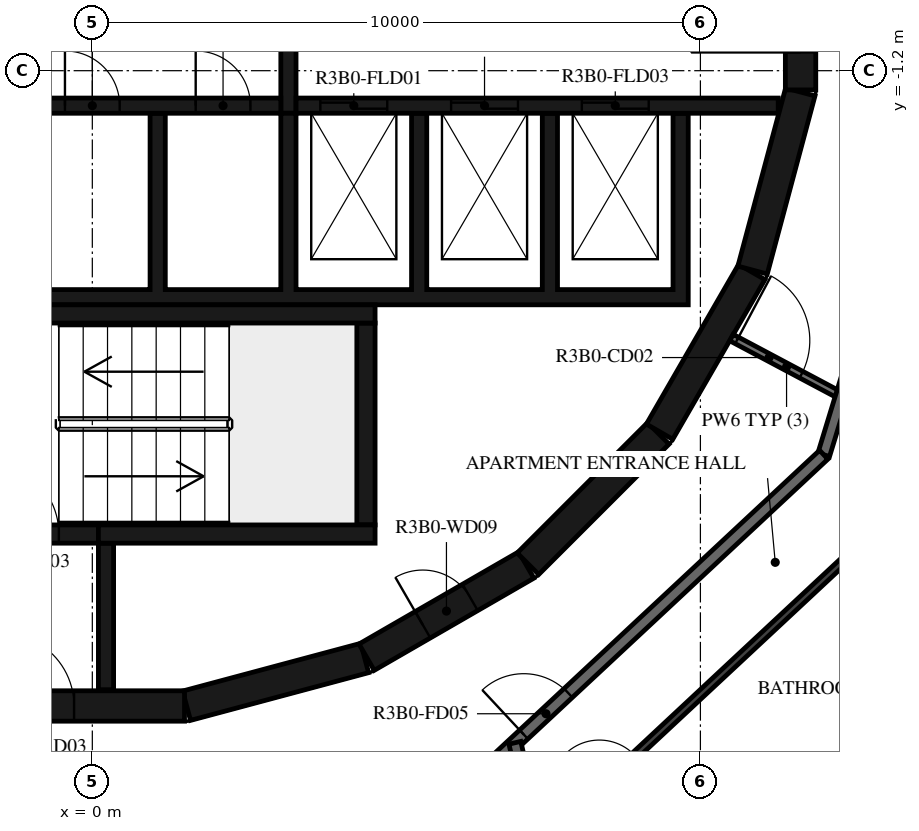
"""IFC4 building model, lengths in metres.
Left out: names, types, materials, properties, quantities, classifications, styles, units other than length and angle.
Written with IfcOpenShell. Run it as: python <this file> out.ifc"""

import sys

from ifc_helpers import new_model, si_unit, direction, frame, frame_2d, origin, place, context, subcontext, project, spatial, polyline, rectangle, outline, extrude, element, fill, save


model = new_model("IFC4")
c1 = context("Model", 3, precision=1e-05, world=origin(), true_north=direction((0.0, 1.0)))
c2 = subcontext(c1, "Body", "Model", "MODEL_VIEW")
j1 = project(units=[si_unit("LENGTHUNIT", "METRE"), si_unit("PLANEANGLEUNIT", "RADIAN")], contexts=[c1])
p1 = place(None, origin())
s1 = spatial("IfcSite", under=j1, at=p1, CompositionType="ELEMENT")
p2 = place(p1, origin())
s2 = spatial("IfcBuilding", under=s1, at=p2, CompositionType="ELEMENT")
p3 = place(p2, frame((0.0, 0.0, 127.4)))
s3 = spatial("IfcBuildingStorey", under=s2, at=p3, CompositionType="ELEMENT", Elevation=127.4)
p4 = place(p3, frame((1.55, -11.643, 0.0), z_axis=(0.0, 0.0, 1.0), x_axis=(0.965948410781, 0.258734743916, 0.0)))
e1 = element("IfcWall", 1, at=p4, inside=s3, PredefinedType="SHEAR", context=c2, shape_type="SweptSolid", body=[
    extrude(rectangle(XDim=3.033, YDim=0.5, at=frame_2d((1.516, 0.0))), origin(), (0.0, 0.0, 1.0), 3.12),
])
p5 = place(p3, frame((4.51, -10.845, 0.0), z_axis=(0.0, 0.0, 1.0), x_axis=(0.865975092491, 0.500087131594, 0.0)))
e2 = element("IfcWall", 2, at=p5, inside=s3, PredefinedType="SHEAR", context=c2, shape_type="SweptSolid", body=[
    extrude(rectangle(XDim=3.033, YDim=0.5, at=frame_2d((1.516, 0.0))), origin(), (0.0, 0.0, 1.0), 3.12),
])
p6 = place(p5, frame((1.066, 0.0, 0.0)))
e3 = element("IfcOpeningElement", 3, at=p6, cuts=e2, PredefinedType="OPENING", context=c2, shape_type="SweptSolid", body=[
    extrude(rectangle(XDim=0.9, YDim=2.1, at=frame_2d((0.45, 1.05))), frame((0.0, 0.26, 0.0), z_axis=(0.0, -1.0, 0.0), x_axis=(1.0, 0.0, 0.0)), (0.0, 0.0, 1.0), 0.52),
])
p7 = place(p3, frame((7.164, -9.308, 0.0), z_axis=(0.0, 0.0, 1.0), x_axis=(0.707106781187, 0.707106781187, 0.0)))
e4 = element("IfcWall", 4, at=p7, inside=s3, PredefinedType="SHEAR", context=c2, shape_type="SweptSolid", body=[
    extrude(rectangle(XDim=3.032, YDim=0.5, at=frame_2d((1.516, 0.0))), origin(), (0.0, 0.0, 1.0), 3.12),
])
for number, where, z_axis, x_axis in (
    (5, (9.329, -7.137, 0.0), (0.0, 0.0, 1.0), (0.5, 0.866, 0.0)),
    (6, (10.858, -4.479, 0.0), (0.0, 0.0, 1.0), (0.259, 0.966, 0.0)),
):
    element("IfcWall", number, at=place(p3, frame(where, z_axis=z_axis, x_axis=x_axis)), inside=s3, PredefinedType="SHEAR", context=c2, shape_type="SweptSolid", body=[
        extrude(rectangle(XDim=3.033, YDim=0.5, at=frame_2d((1.516, 0.0))), origin(), (0.0, 0.0, 1.0), 3.12),
    ])
p8 = place(p3, frame((11.647, -1.516, 0.0), z_axis=(0.0, 0.0, 1.0), x_axis=(0.0, 1.0, 0.0)))
e7 = element("IfcWall", 7, at=p8, inside=s3, PredefinedType="SHEAR", context=c2, shape_type="SweptSolid", body=[
    extrude(rectangle(XDim=3.033, YDim=0.5, at=frame_2d((1.516, 0.0))), origin(), (0.0, 0.0, 1.0), 3.12),
])
p9 = place(p8, frame((0.616, 0.0, 0.0)))
e8 = element("IfcOpeningElement", 8, at=p9, cuts=e7, PredefinedType="OPENING", context=c2, shape_type="SweptSolid", body=[
    extrude(rectangle(XDim=1.8, YDim=2.1, at=frame_2d((0.9, 1.05))), frame((0.0, 0.26, 0.0), z_axis=(0.0, -1.0, 0.0), x_axis=(1.0, 0.0, 0.0)), (0.0, 0.0, 1.0), 0.52),
])
p10 = place(p3, frame((-1.516, -11.647, 0.0), z_axis=(0.0, 0.0, 1.0), x_axis=(1.0, 0.0, 0.0)))
e9 = element("IfcWall", 9, at=p10, inside=s3, PredefinedType="SHEAR", context=c2, shape_type="SweptSolid", body=[
    extrude(rectangle(XDim=3.033, YDim=0.5, at=frame_2d((1.516, 0.0))), origin(), (0.0, 0.0, 1.0), 3.12),
])
p11 = place(p10, frame((0.016, 0.0, 0.0)))
e10 = element("IfcOpeningElement", 10, at=p11, cuts=e9, PredefinedType="OPENING", context=c2, shape_type="SweptSolid", body=[
    extrude(rectangle(XDim=1.2, YDim=2.1, at=frame_2d((0.6, 1.05))), frame((0.0, 0.26, 0.0), z_axis=(0.0, -1.0, 0.0), x_axis=(1.0, 0.0, 0.0)), (0.0, 0.0, 1.0), 0.52),
])
p12 = place(p3, frame((-2.4, -5.2, 0.0), z_axis=(0.0, 0.0, 1.0), x_axis=(1.0, 0.0, 0.0)))
e11 = element("IfcWall", 11, at=p12, inside=s3, PredefinedType="SHEAR", context=c2, shape_type="SweptSolid", body=[
    extrude(rectangle(XDim=7.05, YDim=0.3, at=frame_2d((3.525, 0.0))), origin(), (0.0, 0.0, 1.0), 3.12),
])
p13 = place(p3, frame((4.5, -8.67, 0.0), z_axis=(0.0, 0.0, 1.0), x_axis=(0.0, 1.0, 0.0)))
e12 = element("IfcWall", 12, at=p13, inside=s3, PredefinedType="SHEAR", context=c2, shape_type="SweptSolid", body=[
    extrude(rectangle(XDim=3.32, YDim=0.3, at=frame_2d((1.66, 0.0))), origin(), (0.0, 0.0, 1.0), 3.12),
])
p14 = place(p3, frame((0.1, -8.82, 0.0), z_axis=(0.0, 0.0, 1.0), x_axis=(1.0, 0.0, 0.0)))
e13 = element("IfcWall", 13, at=p14, inside=s3, PredefinedType="SHEAR", context=c2, shape_type="SweptSolid", body=[
    extrude(rectangle(XDim=4.55, YDim=0.3, at=frame_2d((2.275, 0.0))), origin(), (0.0, 0.0, 1.0), 3.12),
])
p15 = place(p3, frame((-2.4, -8.82, 0.0), z_axis=(0.0, 0.0, 1.0), x_axis=(1.0, 0.0, 0.0)))
e14 = element("IfcWall", 14, at=p15, inside=s3, PredefinedType="SHEAR", context=c2, shape_type="SweptSolid", body=[
    extrude(rectangle(XDim=2.5, YDim=0.3, at=frame_2d((1.25, 0.0))), origin(), (0.0, 0.0, 1.0), 3.12),
])
p16 = place(p15, frame((0.65, 0.0, 0.0)))
e15 = element("IfcOpeningElement", 15, at=p16, cuts=e14, PredefinedType="OPENING", context=c2, shape_type="SweptSolid", body=[
    extrude(rectangle(XDim=1.2, YDim=2.1, at=frame_2d((0.6, 1.05))), frame((0.0, 0.16, 0.0), z_axis=(0.0, -1.0, 0.0), x_axis=(1.0, 0.0, 0.0)), (0.0, 0.0, 1.0), 0.32),
])
p17 = place(p3, frame((0.225, -8.97, 0.0), z_axis=(0.0, 0.0, 1.0), x_axis=(0.0, -1.0, 0.0)))
e16 = element("IfcWall", 16, at=p17, inside=s3, PredefinedType="SHEAR", context=c2, shape_type="SweptSolid", body=[
    extrude(rectangle(XDim=2.41, YDim=0.25, at=frame_2d((1.205, 0.0))), origin(), (0.0, 0.0, 1.0), 3.12),
])
p18 = place(p3, origin())
e17 = element("IfcWall", 17, at=p18, inside=s3, PredefinedType="SHEAR", context=c2, shape_type="SweptSolid", body=[
    extrude(outline(polyline([(9.8, -5.05), (9.8, -4.8), (9.8, -1.9), (9.55, -1.9), (9.55, -4.8), (7.65, -4.8), (7.65, -1.9), (7.4, -1.9), (7.4, -4.8), (5.5, -4.8), (5.5, -1.9), (5.25, -1.9), (5.25, -4.8), (3.35, -4.8), (3.35, -1.9), (3.1, -1.9), (3.1, -4.8), (1.2, -4.8), (1.2, -1.9), (0.95, -1.9), (0.95, -4.8), (-0.95, -4.8), (-0.95, -1.9), (-1.2, -1.9), (-1.2, -4.8), (-5.25, -4.8), (-5.25, -1.9), (-5.5, -1.9), (-5.5, -4.8), (-7.4, -4.8), (-7.4, -1.9), (-7.65, -1.9), (-7.65, -4.8), (-9.55, -4.8), (-9.55, -1.9), (-9.8, -1.9), (-9.8, -4.8), (-9.8, -5.05), (9.8, -5.05)])), origin(), (0.0, 0.0, 1.0), 3.12),
])
p19 = place(p3, frame((-11.28, -1.775, 0.0), z_axis=(0.0, 0.0, 1.0), x_axis=(1.0, 0.0, 0.0)))
e18 = element("IfcWall", 18, at=p19, inside=s3, PredefinedType="SHEAR", context=c2, shape_type="SweptSolid", body=[
    extrude(rectangle(XDim=14.38, YDim=0.25, at=frame_2d((7.19, 0.0))), origin(), (0.0, 0.0, 1.0), 3.12),
])
p20 = place(p19, frame((7.605, 0.0, 0.0)))
e19 = element("IfcOpeningElement", 19, at=p20, cuts=e18, PredefinedType="OPENING", context=c2, shape_type="SweptSolid", body=[
    extrude(rectangle(XDim=0.9, YDim=2.1, at=frame_2d((0.45, 1.05))), frame((0.0, 0.135, 0.0), z_axis=(0.0, -1.0, 0.0), x_axis=(1.0, 0.0, 0.0)), (0.0, 0.0, 1.0), 0.27),
])
p21 = place(p19, frame((10.83, 0.0, 0.0)))
e20 = element("IfcOpeningElement", 20, at=p21, cuts=e18, PredefinedType="OPENING", context=c2, shape_type="SweptSolid", body=[
    extrude(rectangle(XDim=0.9, YDim=2.1, at=frame_2d((0.45, 1.05))), frame((0.0, 0.135, 0.0), z_axis=(0.0, -1.0, 0.0), x_axis=(1.0, 0.0, 0.0)), (0.0, 0.0, 1.0), 0.27),
])
p22 = place(p19, frame((12.98, 0.0, 0.0)))
e21 = element("IfcOpeningElement", 21, at=p22, cuts=e18, PredefinedType="OPENING", context=c2, shape_type="SweptSolid", body=[
    extrude(rectangle(XDim=0.9, YDim=2.1, at=frame_2d((0.45, 1.05))), frame((0.0, 0.135, 0.0), z_axis=(0.0, -1.0, 0.0), x_axis=(1.0, 0.0, 0.0)), (0.0, 0.0, 1.0), 0.27),
])
p23 = place(p3, frame((3.35, -1.775, 0.0), z_axis=(0.0, 0.0, 1.0), x_axis=(1.0, 0.0, 0.0)))
e22 = element("IfcWall", 22, at=p23, inside=s3, PredefinedType="SHEAR", context=c2, shape_type="SweptSolid", body=[
    extrude(rectangle(XDim=7.93, YDim=0.25, at=frame_2d((3.965, 0.0))), origin(), (0.0, 0.0, 1.0), 3.12),
])
p24 = place(p23, frame((0.4, 0.0, 0.0)))
e23 = element("IfcOpeningElement", 23, at=p24, cuts=e22, PredefinedType="OPENING", context=c2, shape_type="SweptSolid", body=[
    extrude(rectangle(XDim=1.1, YDim=2.4, at=frame_2d((0.55, 1.2))), frame((0.0, 0.135, 0.0), z_axis=(0.0, -1.0, 0.0), x_axis=(1.0, 0.0, 0.0)), (0.0, 0.0, 1.0), 0.27),
])
p25 = place(p23, frame((2.55, 0.0, 0.0)))
e24 = element("IfcOpeningElement", 24, at=p25, cuts=e22, PredefinedType="OPENING", context=c2, shape_type="SweptSolid", body=[
    extrude(rectangle(XDim=1.1, YDim=2.4, at=frame_2d((0.55, 1.2))), frame((0.0, 0.135, 0.0), z_axis=(0.0, -1.0, 0.0), x_axis=(1.0, 0.0, 0.0)), (0.0, 0.0, 1.0), 0.27),
])
p26 = place(p23, frame((4.7, 0.0, 0.0)))
e25 = element("IfcOpeningElement", 25, at=p26, cuts=e22, PredefinedType="OPENING", context=c2, shape_type="SweptSolid", body=[
    extrude(rectangle(XDim=1.1, YDim=2.4, at=frame_2d((0.55, 1.2))), frame((0.0, 0.135, 0.0), z_axis=(0.0, -1.0, 0.0), x_axis=(1.0, 0.0, 0.0)), (0.0, 0.0, 1.0), 0.27),
])
p27 = place(p3, frame((3.225, -1.9, 0.0), z_axis=(0.0, 0.0, 1.0), x_axis=(0.0, 1.0, 0.0)))
e26 = element("IfcWall", 26, at=p27, inside=s3, PredefinedType="SHEAR", context=c2, shape_type="SweptSolid", body=[
    extrude(rectangle(XDim=3.8, YDim=0.25, at=frame_2d((1.9, 0.0))), origin(), (0.0, 0.0, 1.0), 3.12),
])
p28 = place(p3, frame((10.511, -5.589, 0.0), z_axis=(0.0, 0.0, 1.0), x_axis=(0.882987820808, -0.469395897196, 0.0)))
e27 = element("IfcWall", 27, at=p28, inside=s3, PredefinedType="PARTITIONING", context=c2, shape_type="SweptSolid", body=[
    extrude(rectangle(XDim=2.052, YDim=0.12, at=frame_2d((1.026, 0.0))), origin(), (0.0, 0.0, 1.0), 3.12),
])
p29 = place(p28, frame((0.1, 0.0, 0.0)))
e28 = element("IfcOpeningElement", 28, at=p29, cuts=e27, PredefinedType="OPENING", context=c2, shape_type="SweptSolid", body=[
    extrude(rectangle(XDim=1.2, YDim=2.1, at=frame_2d((0.6, 1.05))), frame((0.0, 0.07, 0.0), z_axis=(0.0, -1.0, 0.0), x_axis=(1.0, 0.0, 0.0)), (0.0, 0.0, 1.0), 0.14),
])
p30 = place(p3, frame((12.028, -7.516, 0.0), z_axis=(0.0, 0.0, 1.0), x_axis=(0.292365533182, 0.956306642771, 0.0)))
e29 = element("IfcWall", 29, at=p30, inside=s3, PredefinedType="STANDARD", context=c2, shape_type="SweptSolid", body=[
    extrude(rectangle(XDim=7.342, YDim=0.2, at=frame_2d((3.671, 0.0))), origin(), (0.0, 0.0, 1.0), 3.12),
])
p31 = place(p3, frame((-7.516, -12.028, 0.0), z_axis=(0.0, 0.0, 1.0), x_axis=(0.956306642771, -0.292365533182, 0.0)))
e30 = element("IfcWall", 30, at=p31, inside=s3, PredefinedType="STANDARD", context=c2, shape_type="SweptSolid", body=[
    extrude(rectangle(XDim=7.342, YDim=0.2, at=frame_2d((3.671, 0.0))), origin(), (0.0, 0.0, 1.0), 3.12),
])
p32 = place(p31, frame((6.142, 0.0, 0.0)))
e31 = element("IfcOpeningElement", 31, at=p32, cuts=e30, PredefinedType="OPENING", context=c2, shape_type="SweptSolid", body=[
    extrude(rectangle(XDim=1.0, YDim=2.1, at=frame_2d((0.5, 1.05))), frame((0.0, 0.11, 0.0), z_axis=(0.0, -1.0, 0.0), x_axis=(1.0, 0.0, 0.0)), (0.0, 0.0, 1.0), 0.22),
])
p33 = place(p3, frame((6.659, -12.523, 0.0), z_axis=(0.0, 0.0, 1.0), x_axis=(0.731350455479, 0.682001841105, 0.0)))
e32 = element("IfcWall", 32, at=p33, inside=s3, PredefinedType="STANDARD", context=c2, shape_type="SweptSolid", body=[
    extrude(rectangle(XDim=7.342, YDim=0.2, at=frame_2d((3.671, 0.0))), origin(), (0.0, 0.0, 1.0), 3.12),
])
p34 = place(p33, frame((0.597, 0.0, 0.0)))
e33 = element("IfcOpeningElement", 33, at=p34, cuts=e32, PredefinedType="OPENING", context=c2, shape_type="SweptSolid", body=[
    extrude(rectangle(XDim=1.0, YDim=2.1, at=frame_2d((0.5, 1.05))), frame((0.0, 0.11, 0.0), z_axis=(0.0, -1.0, 0.0), x_axis=(1.0, 0.0, 0.0)), (0.0, 0.0, 1.0), 0.22),
])
p35 = place(p3, frame((7.34, -13.946, 0.0), z_axis=(0.0, 0.0, 1.0), x_axis=(-0.224849249613, 0.974393562658, 0.0)))
e34 = element("IfcWall", 34, at=p35, inside=s3, PredefinedType="STANDARD", context=c2, shape_type="SweptSolid", body=[
    extrude(rectangle(XDim=1.738, YDim=0.2, at=frame_2d((0.869, 0.0))), origin(), (0.0, 0.0, 1.0), 3.12),
])
p36 = place(p3, frame((-13.939, -18.911, 0.0), z_axis=(0.0, 0.0, 1.0), x_axis=(0.974369607456, 0.224953035245, 0.0)))
e35 = element("IfcWall", 35, at=p36, inside=s3, PredefinedType="PARTITIONING", context=c2, shape_type="SweptSolid", body=[
    extrude(rectangle(XDim=33.934, YDim=0.12, at=frame_2d((16.967, 0.0))), origin(), (0.0, 0.0, 1.0), 3.12),
])
p37 = place(p36, frame((2.0, 0.0, 0.0)))
e36 = element("IfcOpeningElement", 36, at=p37, cuts=e35, PredefinedType="OPENING", context=c2, shape_type="SweptSolid", body=[
    extrude(rectangle(XDim=0.9, YDim=2.1, at=frame_2d((0.45, 1.05))), frame((0.0, 0.07, 0.0), z_axis=(0.0, -1.0, 0.0), x_axis=(1.0, 0.0, 0.0)), (0.0, 0.0, 1.0), 0.14),
])
p38 = place(p36, frame((28.154, 0.0, 0.0)))
e37 = element("IfcOpeningElement", 37, at=p38, cuts=e35, PredefinedType="OPENING", context=c2, shape_type="SweptSolid", body=[
    extrude(rectangle(XDim=0.9, YDim=2.1, at=frame_2d((0.45, 1.05))), frame((0.0, 0.07, 0.0), z_axis=(0.0, -1.0, 0.0), x_axis=(1.0, 0.0, 0.0)), (0.0, 0.0, 1.0), 0.14),
])
p39 = place(p36, frame((30.039, 0.0, 0.0)))
e38 = element("IfcOpeningElement", 38, at=p39, cuts=e35, PredefinedType="OPENING", context=c2, shape_type="SweptSolid", body=[
    extrude(rectangle(XDim=0.9, YDim=2.1, at=frame_2d((0.45, 1.05))), frame((0.0, 0.07, 0.0), z_axis=(0.0, -1.0, 0.0), x_axis=(1.0, 0.0, 0.0)), (0.0, 0.0, 1.0), 0.14),
])
p40 = place(p3, frame((7.388, -13.894, 0.0), z_axis=(0.0, 0.0, 1.0), x_axis=(0.731346321845, 0.682006273815, 0.0)))
e39 = element("IfcWall", 39, at=p40, inside=s3, PredefinedType="PARTITIONING", context=c2, shape_type="SweptSolid", body=[
    extrude(rectangle(XDim=7.585, YDim=0.12, at=frame_2d((3.793, 0.0))), origin(), (0.0, 0.0, 1.0), 3.12),
])
p41 = place(p40, frame((1.3, 0.0, 0.0)))
e40 = element("IfcOpeningElement", 40, at=p41, cuts=e39, PredefinedType="OPENING", context=c2, shape_type="SweptSolid", body=[
    extrude(rectangle(XDim=0.8, YDim=2.1, at=frame_2d((0.4, 1.05))), frame((0.0, 0.07, 0.0), z_axis=(0.0, -1.0, 0.0), x_axis=(1.0, 0.0, 0.0)), (0.0, 0.0, 1.0), 0.14),
])
p42 = place(p16, origin())
e41 = element("IfcDoor", 41, at=p42, inside=s3, OperationType="SINGLE_SWING_LEFT", PredefinedType="DOOR", context=c2, shape_type="SweptSolid", body=[
    extrude(rectangle(XDim=1.2, YDim=2.1, at=frame_2d((0.6, 1.05))), frame((0.0, 0.025, 0.0), z_axis=(0.0, -1.0, 0.0), x_axis=(1.0, 0.0, 0.0)), (0.0, 0.0, 1.0), 0.05),
])
fill(e15, e41)
p43 = place(p11, origin())
e42 = element("IfcDoor", 42, at=p43, inside=s3, OperationType="SINGLE_SWING_RIGHT", PredefinedType="DOOR", context=c2, shape_type="SweptSolid", body=[
    extrude(rectangle(XDim=1.2, YDim=2.1, at=frame_2d((0.6, 1.05))), frame((0.0, 0.025, 0.0), z_axis=(0.0, -1.0, 0.0), x_axis=(1.0, 0.0, 0.0)), (0.0, 0.0, 1.0), 0.05),
])
fill(e10, e42)
p44 = place(p9, origin())
e43 = element("IfcDoor", 43, at=p44, inside=s3, OperationType="DOUBLE_DOOR_SINGLE_SWING", PredefinedType="DOOR", context=c2, shape_type="SweptSolid", body=[
    extrude(rectangle(XDim=1.8, YDim=2.1, at=frame_2d((0.9, 1.05))), frame((0.0, 0.025, 0.0), z_axis=(0.0, -1.0, 0.0), x_axis=(1.0, 0.0, 0.0)), (0.0, 0.0, 1.0), 0.05),
])
fill(e8, e43)
p45 = place(p24, origin())
e44 = element("IfcDoor", 44, at=p45, inside=s3, OperationType="DOUBLE_DOOR_SLIDING", PredefinedType="DOOR", context=c2, shape_type="SweptSolid", body=[
    extrude(rectangle(XDim=1.1, YDim=2.4, at=frame_2d((0.55, 1.2))), frame((0.0, 0.025, 0.0), z_axis=(0.0, -1.0, 0.0), x_axis=(1.0, 0.0, 0.0)), (0.0, 0.0, 1.0), 0.05),
])
fill(e23, e44)
p46 = place(p25, origin())
e45 = element("IfcDoor", 45, at=p46, inside=s3, OperationType="DOUBLE_DOOR_SLIDING", PredefinedType="DOOR", context=c2, shape_type="SweptSolid", body=[
    extrude(rectangle(XDim=1.1, YDim=2.4, at=frame_2d((0.55, 1.2))), frame((0.0, 0.025, 0.0), z_axis=(0.0, -1.0, 0.0), x_axis=(1.0, 0.0, 0.0)), (0.0, 0.0, 1.0), 0.05),
])
fill(e24, e45)
p47 = place(p26, origin())
e46 = element("IfcDoor", 46, at=p47, inside=s3, OperationType="DOUBLE_DOOR_SLIDING", PredefinedType="DOOR", context=c2, shape_type="SweptSolid", body=[
    extrude(rectangle(XDim=1.1, YDim=2.4, at=frame_2d((0.55, 1.2))), frame((0.0, 0.025, 0.0), z_axis=(0.0, -1.0, 0.0), x_axis=(1.0, 0.0, 0.0)), (0.0, 0.0, 1.0), 0.05),
])
fill(e25, e46)
p48 = place(p21, origin())
e47 = element("IfcDoor", 47, at=p48, inside=s3, OperationType="SINGLE_SWING_LEFT", PredefinedType="DOOR", context=c2, shape_type="SweptSolid", body=[
    extrude(rectangle(XDim=0.9, YDim=2.1, at=frame_2d((0.45, 1.05))), frame((0.0, 0.025, 0.0), z_axis=(0.0, -1.0, 0.0), x_axis=(1.0, 0.0, 0.0)), (0.0, 0.0, 1.0), 0.05),
])
fill(e20, e47)
p49 = place(p22, origin())
e48 = element("IfcDoor", 48, at=p49, inside=s3, OperationType="SINGLE_SWING_RIGHT", PredefinedType="DOOR", context=c2, shape_type="SweptSolid", body=[
    extrude(rectangle(XDim=0.9, YDim=2.1, at=frame_2d((0.45, 1.05))), frame((0.0, 0.025, 0.0), z_axis=(0.0, -1.0, 0.0), x_axis=(1.0, 0.0, 0.0)), (0.0, 0.0, 1.0), 0.05),
])
fill(e21, e48)
p50 = place(p6, origin())
e49 = element("IfcDoor", 49, at=p50, inside=s3, OperationType="SINGLE_SWING_RIGHT", PredefinedType="DOOR", context=c2, shape_type="SweptSolid", body=[
    extrude(rectangle(XDim=0.9, YDim=2.1, at=frame_2d((0.45, 1.05))), frame((0.0, 0.025, 0.0), z_axis=(0.0, -1.0, 0.0), x_axis=(1.0, 0.0, 0.0)), (0.0, 0.0, 1.0), 0.05),
])
fill(e3, e49)
p51 = place(p34, origin())
e50 = element("IfcDoor", 50, at=p51, inside=s3, OperationType="SINGLE_SWING_RIGHT", PredefinedType="DOOR", context=c2, shape_type="SweptSolid", body=[
    extrude(rectangle(XDim=1.0, YDim=2.1, at=frame_2d((0.5, 1.05))), frame((0.0, 0.025, 0.0), z_axis=(0.0, -1.0, 0.0), x_axis=(1.0, 0.0, 0.0)), (0.0, 0.0, 1.0), 0.05),
])
fill(e33, e50)
p52 = place(p29, origin())
e51 = element("IfcDoor", 51, at=p52, inside=s3, OperationType="DOUBLE_DOOR_SINGLE_SWING", PredefinedType="DOOR", context=c2, shape_type="SweptSolid", body=[
    extrude(rectangle(XDim=1.2, YDim=2.1, at=frame_2d((0.6, 1.05))), frame((0.0, 0.025, 0.0), z_axis=(0.0, -1.0, 0.0), x_axis=(1.0, 0.0, 0.0)), (0.0, 0.0, 1.0), 0.05),
])
fill(e28, e51)
save(model, sys.argv[1])
